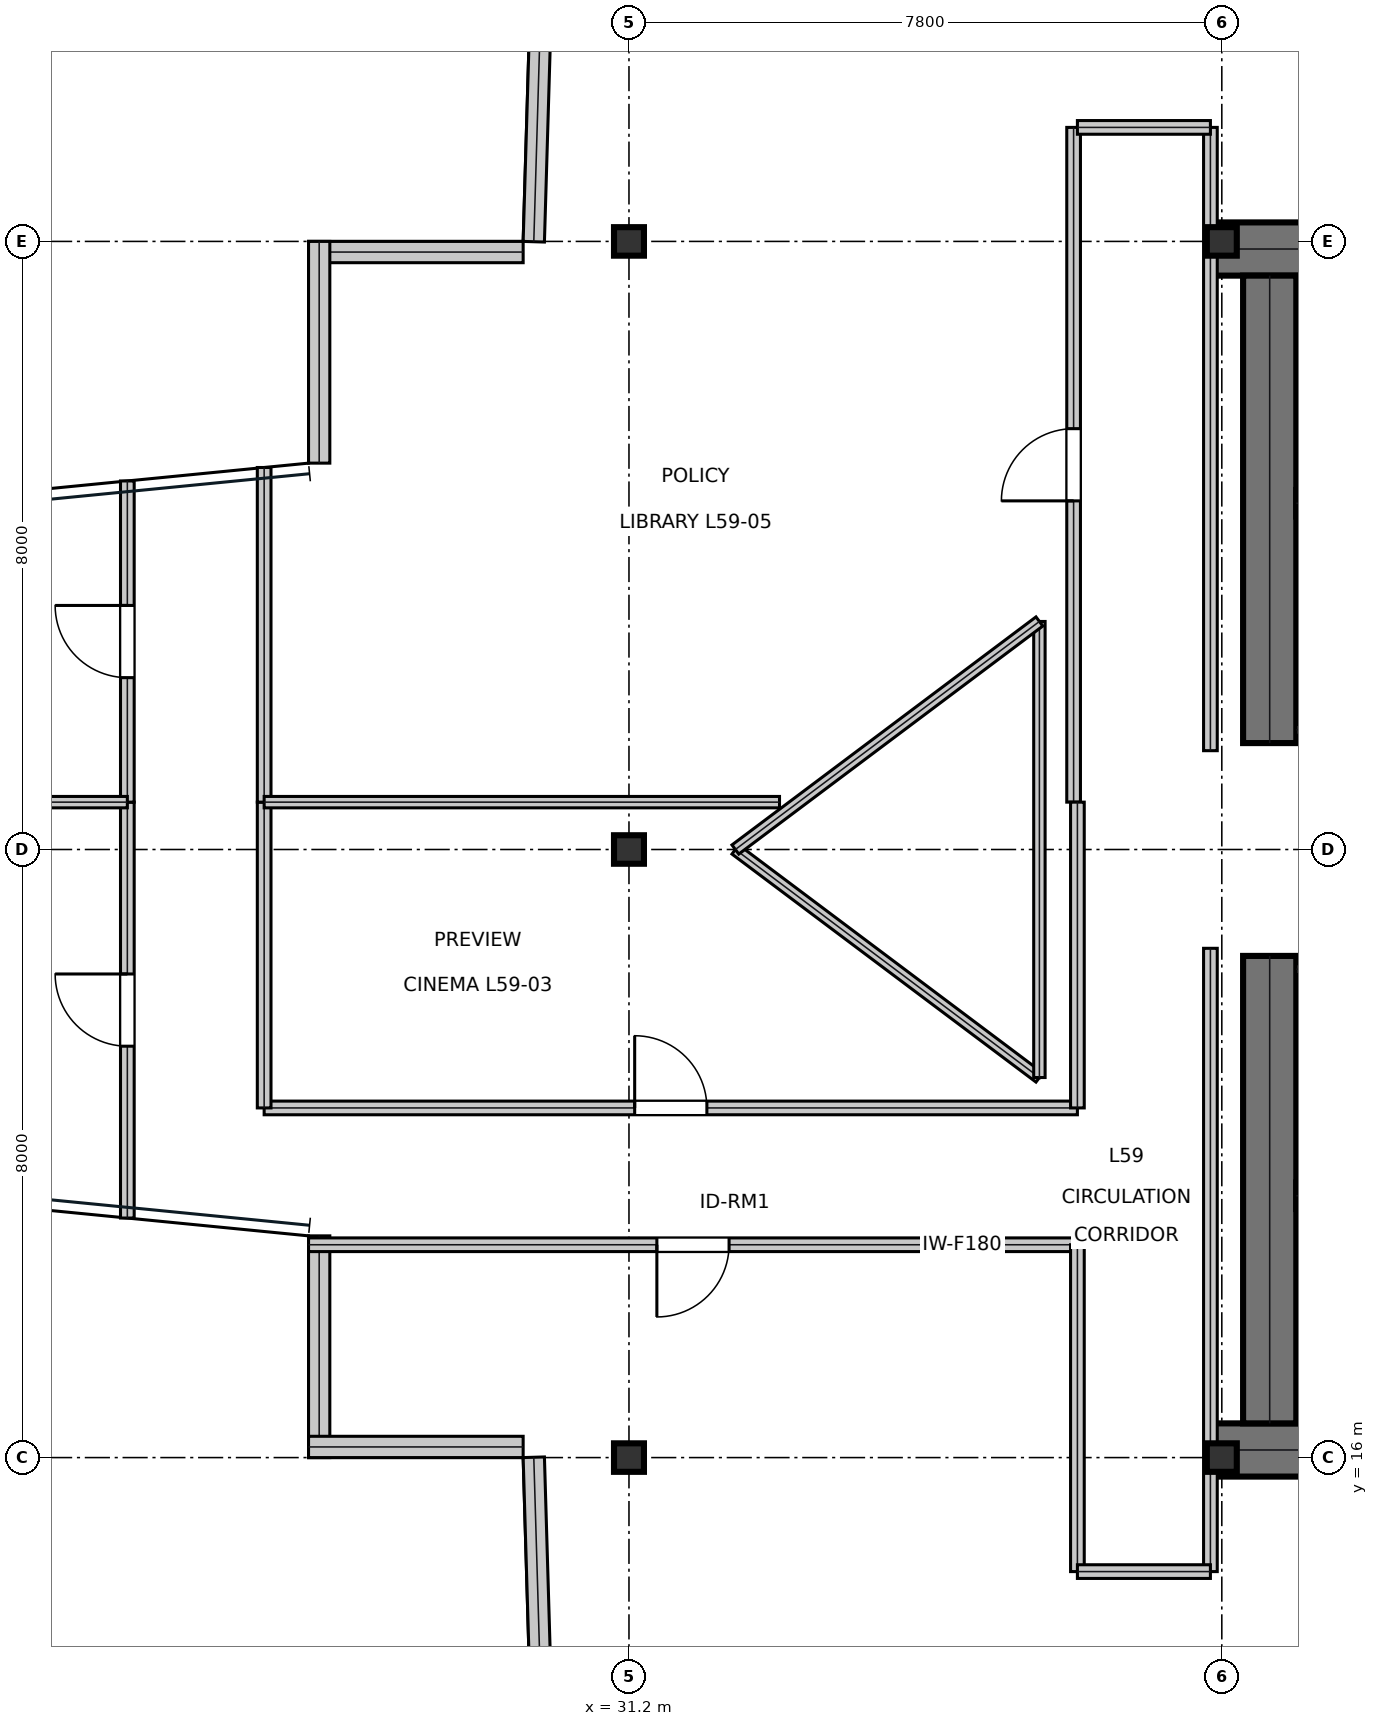
"""IFC4 building model, lengths in metres.
Left out: names, types, materials, properties, quantities, classifications, styles, units other than length and angle.
Written with IfcOpenShell. Run it as: python <this file> out.ifc"""

import sys

from ifc_helpers import new_model, si_unit, direction, frame, frame_2d, origin, origin_2d, place, context, subcontext, project, spatial, rectangle, i_section, extrude, element, fill, save


model = new_model("IFC4")
c1 = context("Model", 3, precision=1e-05, world=origin(), true_north=direction((0.0, 1.0)))
c2 = subcontext(c1, "Body", "Model", "MODEL_VIEW")
j1 = project(units=[si_unit("LENGTHUNIT", "METRE"), si_unit("PLANEANGLEUNIT", "RADIAN")], contexts=[c1])
p1 = place(None, origin())
s1 = spatial("IfcSite", under=j1, at=p1, CompositionType="ELEMENT")
p2 = place(p1, origin())
s2 = spatial("IfcBuilding", under=s1, at=p2, CompositionType="ELEMENT")
p3 = place(p2, frame((0.0, 0.0, 252.6)))
s3 = spatial("IfcBuildingStorey", under=s2, at=p3, CompositionType="ELEMENT", Elevation=252.6)
for number, where, z_axis, x_axis in (
    (1, (38.8, 31.9, 0.0), (0.0, 0.0, 1.0), (1.0, 0.0, 0.0)),
    (2, (38.8, 16.1, 0.0), (0.0, 0.0, 1.0), (1.0, 0.0, 0.0)),
):
    element("IfcWall", number, at=place(p3, frame(where, z_axis=z_axis, x_axis=x_axis)), inside=s3, PredefinedType="SHEAR", context=c2, shape_type="SweptSolid", body=[
        extrude(rectangle(XDim=16.0, YDim=0.7, at=frame_2d((8.0, 0.0))), origin(), (0.0, 0.0, 1.0), 3.73),
    ])
for number, where, z_axis, x_axis in (
    (3, (39.63, 16.45, 0.0), (0.0, 0.0, 1.0), (0.0, 1.0, 0.0)),
    (4, (39.63, 25.4, 0.0), (0.0, 0.0, 1.0), (0.0, 1.0, 0.0)),
):
    element("IfcWall", number, at=place(p3, frame(where, z_axis=z_axis, x_axis=x_axis)), inside=s3, PredefinedType="SHEAR", context=c2, shape_type="SweptSolid", body=[
        extrude(rectangle(XDim=6.15, YDim=0.7, at=frame_2d((3.075, 0.0))), origin(), (0.0, 0.0, 1.0), 3.73),
    ])
p4 = place(p3, frame((39.98, 28.555, 0.0), z_axis=(0.0, 0.0, 1.0), x_axis=(1.0, 0.0, 0.0)))
e5 = element("IfcWall", 5, at=p4, inside=s3, PredefinedType="SHEAR", context=c2, shape_type="SweptSolid", body=[
    extrude(rectangle(XDim=7.71, YDim=0.35, at=frame_2d((3.855, 0.0))), origin(), (0.0, 0.0, 1.0), 3.73),
])
p5 = place(p4, frame((0.25, 0.0, 0.0)))
e6 = element("IfcOpeningElement", 6, at=p5, cuts=e5, PredefinedType="OPENING", context=c2, shape_type="SweptSolid", body=[
    extrude(rectangle(XDim=1.1, YDim=2.15, at=frame_2d((0.55, 1.075))), frame((0.0, 0.185, 0.0), z_axis=(0.0, -1.0, 0.0), x_axis=(1.0, 0.0, 0.0)), (0.0, 0.0, 1.0), 0.37),
])
p6 = place(p3, frame((39.98, 19.445, 0.0), z_axis=(0.0, 0.0, 1.0), x_axis=(1.0, 0.0, 0.0)))
e7 = element("IfcWall", 7, at=p6, inside=s3, PredefinedType="SHEAR", context=c2, shape_type="SweptSolid", body=[
    extrude(rectangle(XDim=7.71, YDim=0.35, at=frame_2d((3.855, 0.0))), origin(), (0.0, 0.0, 1.0), 3.73),
])
p7 = place(p6, frame((0.25, 0.0, 0.0)))
e8 = element("IfcOpeningElement", 8, at=p7, cuts=e7, PredefinedType="OPENING", context=c2, shape_type="SweptSolid", body=[
    extrude(rectangle(XDim=1.1, YDim=2.15, at=frame_2d((0.55, 1.075))), frame((0.0, 0.185, 0.0), z_axis=(0.0, -1.0, 0.0), x_axis=(1.0, 0.0, 0.0)), (0.0, 0.0, 1.0), 0.37),
])
for number, where, z_axis, x_axis in (
    (9, (31.2, 16.0, 0.0), (0.0, 0.0, 1.0), (1.0, 0.0, 0.0)),
    (10, (31.2, 24.0, 0.0), (0.0, 0.0, 1.0), (1.0, 0.0, 0.0)),
    (11, (31.2, 32.0, 0.0), (0.0, 0.0, 1.0), (1.0, 0.0, 0.0)),
    (12, (39.0, 16.0, 0.0), (0.0, 0.0, 1.0), (1.0, 0.0, 0.0)),
    (13, (39.0, 32.0, 0.0), (0.0, 0.0, 1.0), (1.0, 0.0, 0.0)),
):
    element("IfcColumn", number, at=place(p3, frame(where, z_axis=z_axis, x_axis=x_axis)), inside=s3, PredefinedType="COLUMN", context=c2, shape_type="SweptSolid", body=[
        extrude(i_section(OverallWidth=0.394, OverallDepth=0.375, WebThickness=0.017, FlangeThickness=0.028, at=origin_2d()), origin(), (0.0, 0.0, 1.0), 4.044),
    ])
p8 = place(p3, frame((30.142, 38.559, 0.0), z_axis=(0.0, 0.0, 1.0), x_axis=(-0.029597919089, -0.999561885621, 0.0)))
e14 = element("IfcWall", 14, at=p8, inside=s3, PredefinedType="STANDARD", context=c2, shape_type="SweptSolid", body=[
    extrude(rectangle(XDim=6.566, YDim=0.28, at=frame_2d((3.283, 0.0))), origin(), (0.0, 0.0, 1.0), 3.73),
])
p9 = place(p3, frame((29.808, 31.86, 0.0), z_axis=(0.0, 0.0, 1.0), x_axis=(-1.0, 0.0, 0.0)))
e15 = element("IfcWall", 15, at=p9, inside=s3, PredefinedType="STANDARD", context=c2, shape_type="SweptSolid", body=[
    extrude(rectangle(XDim=2.824, YDim=0.28, at=frame_2d((1.412, 0.0))), origin(), (0.0, 0.0, 1.0), 3.73),
])
for number, where, z_axis, x_axis in (
    (16, (27.124, 32.0, 0.0), (0.0, 0.0, 1.0), (0.0, -1.0, 0.0)),
    (17, (27.124, 18.917, 0.0), (0.0, 0.0, 1.0), (0.0, -1.0, 0.0)),
):
    element("IfcWall", number, at=place(p3, frame(where, z_axis=z_axis, x_axis=x_axis)), inside=s3, PredefinedType="STANDARD", context=c2, shape_type="SweptSolid", body=[
        extrude(rectangle(XDim=2.917, YDim=0.28, at=frame_2d((1.458, 0.0))), origin(), (0.0, 0.0, 1.0), 3.259),
    ])
p10 = place(p3, frame((26.984, 16.14, 0.0), z_axis=(0.0, 0.0, 1.0), x_axis=(1.0, 0.0, 0.0)))
e18 = element("IfcWall", 18, at=p10, inside=s3, PredefinedType="STANDARD", context=c2, shape_type="SweptSolid", body=[
    extrude(rectangle(XDim=2.824, YDim=0.28, at=frame_2d((1.412, 0.0))), origin(), (0.0, 0.0, 1.0), 3.73),
])
p11 = place(p3, frame((29.948, 16.004, 0.0), z_axis=(0.0, 0.0, 1.0), x_axis=(0.029597919089, -0.999561885621, 0.0)))
e19 = element("IfcWall", 19, at=p11, inside=s3, PredefinedType="STANDARD", context=c2, shape_type="SweptSolid", body=[
    extrude(rectangle(XDim=6.566, YDim=0.28, at=frame_2d((3.283, 0.0))), origin(), (0.0, 0.0, 1.0), 3.73),
])
p12 = place(p3, frame((39.98, 25.575, 0.0), z_axis=(0.0, 0.0, 1.0), x_axis=(1.0, 0.0, 0.0)))
e20 = element("IfcWall", 20, at=p12, inside=s3, PredefinedType="PARTITIONING", context=c2, shape_type="SweptSolid", body=[
    extrude(rectangle(XDim=5.9, YDim=0.15, at=frame_2d((2.95, 0.0))), origin(), (0.0, 0.0, 1.0), 3.73),
])
p13 = place(p12, frame((2.35, 0.0, 0.0)))
e21 = element("IfcOpeningElement", 21, at=p13, cuts=e20, PredefinedType="OPENING", context=c2, shape_type="SweptSolid", body=[
    extrude(rectangle(XDim=1.05, YDim=2.15, at=frame_2d((0.525, 1.075))), frame((0.0, 0.085, 0.0), z_axis=(0.0, -1.0, 0.0), x_axis=(1.0, 0.0, 0.0)), (0.0, 0.0, 1.0), 0.17),
])
p14 = place(p3, frame((39.98, 22.425, 0.0), z_axis=(0.0, 0.0, 1.0), x_axis=(1.0, 0.0, 0.0)))
e22 = element("IfcWall", 22, at=p14, inside=s3, PredefinedType="PARTITIONING", context=c2, shape_type="SweptSolid", body=[
    extrude(rectangle(XDim=5.9, YDim=0.15, at=frame_2d((2.95, 0.0))), origin(), (0.0, 0.0, 1.0), 3.73),
])
p15 = place(p14, frame((2.35, 0.0, 0.0)))
e23 = element("IfcOpeningElement", 23, at=p15, cuts=e22, PredefinedType="OPENING", context=c2, shape_type="SweptSolid", body=[
    extrude(rectangle(XDim=1.05, YDim=2.15, at=frame_2d((0.525, 1.075))), frame((0.0, 0.085, 0.0), z_axis=(0.0, -1.0, 0.0), x_axis=(1.0, 0.0, 0.0)), (0.0, 0.0, 1.0), 0.17),
])
p16 = place(p3, frame((26.984, 18.8, 0.0), z_axis=(0.0, 0.0, 1.0), x_axis=(1.0, 0.0, 0.0)))
e24 = element("IfcWall", 24, at=p16, inside=s3, PredefinedType="SOLIDWALL", context=c2, shape_type="SweptSolid", body=[
    extrude(rectangle(XDim=10.116, YDim=0.18, at=frame_2d((5.058, 0.0))), origin(), (0.0, 0.0, 1.0), 3.181),
])
p17 = place(p16, frame((4.583, 0.0, 0.0)))
e25 = element("IfcOpeningElement", 25, at=p17, cuts=e24, PredefinedType="OPENING", context=c2, shape_type="SweptSolid", body=[
    extrude(rectangle(XDim=0.95, YDim=2.15, at=frame_2d((0.475, 1.075))), frame((0.0, 0.1, 0.0), z_axis=(0.0, -1.0, 0.0), x_axis=(1.0, 0.0, 0.0)), (0.0, 0.0, 1.0), 0.2),
])
p18 = place(p3, frame((24.6, 19.151, 0.0), z_axis=(0.0, 0.0, 1.0), x_axis=(0.0, 1.0, 0.0)))
e26 = element("IfcWall", 26, at=p18, inside=s3, PredefinedType="SOLIDWALL", context=c2, shape_type="SweptSolid", body=[
    extrude(rectangle(XDim=5.472, YDim=0.18, at=frame_2d((2.736, 0.0))), origin(), (0.0, 0.0, 1.0), 3.181),
])
p19 = place(p18, frame((2.261, 0.0, 0.0)))
e27 = element("IfcOpeningElement", 27, at=p19, cuts=e26, PredefinedType="OPENING", context=c2, shape_type="SweptSolid", body=[
    extrude(rectangle(XDim=0.95, YDim=2.15, at=frame_2d((0.475, 1.075))), frame((0.0, 0.1, 0.0), z_axis=(0.0, -1.0, 0.0), x_axis=(1.0, 0.0, 0.0)), (0.0, 0.0, 1.0), 0.2),
])
p20 = place(p3, frame((26.4, 20.6, 0.0), z_axis=(0.0, 0.0, 1.0), x_axis=(1.0, 0.0, 0.0)))
e28 = element("IfcWall", 28, at=p20, inside=s3, PredefinedType="SOLIDWALL", context=c2, shape_type="SweptSolid", body=[
    extrude(rectangle(XDim=10.7, YDim=0.18, at=frame_2d((5.35, 0.0))), origin(), (0.0, 0.0, 1.0), 3.181),
])
p21 = place(p20, frame((4.875, 0.0, 0.0)))
e29 = element("IfcOpeningElement", 29, at=p21, cuts=e28, PredefinedType="OPENING", context=c2, shape_type="SweptSolid", body=[
    extrude(rectangle(XDim=0.95, YDim=2.15, at=frame_2d((0.475, 1.075))), frame((0.0, 0.1, 0.0), z_axis=(0.0, -1.0, 0.0), x_axis=(1.0, 0.0, 0.0)), (0.0, 0.0, 1.0), 0.2),
])
p22 = place(p3, frame((24.6, 24.623, 0.0), z_axis=(0.0, 0.0, 1.0), x_axis=(0.0, 1.0, 0.0)))
e30 = element("IfcWall", 30, at=p22, inside=s3, PredefinedType="SOLIDWALL", context=c2, shape_type="SweptSolid", body=[
    extrude(rectangle(XDim=4.226, YDim=0.18, at=frame_2d((2.113, 0.0))), origin(), (0.0, 0.0, 1.0), 3.181),
])
p23 = place(p22, frame((1.638, 0.0, 0.0)))
e31 = element("IfcOpeningElement", 31, at=p23, cuts=e30, PredefinedType="OPENING", context=c2, shape_type="SweptSolid", body=[
    extrude(rectangle(XDim=0.95, YDim=2.15, at=frame_2d((0.475, 1.075))), frame((0.0, 0.1, 0.0), z_axis=(0.0, -1.0, 0.0), x_axis=(1.0, 0.0, 0.0)), (0.0, 0.0, 1.0), 0.2),
])
p24 = place(p3, frame((37.05, 24.623, 0.0), z_axis=(0.0, 0.0, 1.0), x_axis=(0.0, 1.0, 0.0)))
e32 = element("IfcWall", 32, at=p24, inside=s3, PredefinedType="SOLIDWALL", context=c2, shape_type="SweptSolid", body=[
    extrude(rectangle(XDim=8.877, YDim=0.18, at=frame_2d((4.438, 0.0))), origin(), (0.0, 0.0, 1.0), 3.181),
])
p25 = place(p24, frame((3.963, 0.0, 0.0)))
e33 = element("IfcOpeningElement", 33, at=p25, cuts=e32, PredefinedType="OPENING", context=c2, shape_type="SweptSolid", body=[
    extrude(rectangle(XDim=0.95, YDim=2.15, at=frame_2d((0.475, 1.075))), frame((0.0, 0.1, 0.0), z_axis=(0.0, -1.0, 0.0), x_axis=(1.0, 0.0, 0.0)), (0.0, 0.0, 1.0), 0.2),
])
p26 = place(p3, frame((38.85, 14.5, 0.0), z_axis=(0.0, 0.0, 1.0), x_axis=(0.0, 1.0, 0.0)))
e34 = element("IfcWall", 34, at=p26, inside=s3, PredefinedType="SOLIDWALL", context=c2, shape_type="SweptSolid", body=[
    extrude(rectangle(XDim=8.2, YDim=0.18, at=frame_2d((4.1, 0.0))), origin(), (0.0, 0.0, 1.0), 3.181),
])
p27 = place(p3, frame((37.1, 14.5, 0.0), z_axis=(0.0, 0.0, 1.0), x_axis=(0.0, 1.0, 0.0)))
e35 = element("IfcWall", 35, at=p27, inside=s3, PredefinedType="SOLIDWALL", context=c2, shape_type="SweptSolid", body=[
    extrude(rectangle(XDim=4.3, YDim=0.18, at=frame_2d((2.15, 0.0))), origin(), (0.0, 0.0, 1.0), 3.181),
])
p28 = place(p3, frame((37.1, 14.5, 0.0), z_axis=(0.0, 0.0, 1.0), x_axis=(1.0, 0.0, 0.0)))
e36 = element("IfcWall", 36, at=p28, inside=s3, PredefinedType="SOLIDWALL", context=c2, shape_type="SweptSolid", body=[
    extrude(rectangle(XDim=1.75, YDim=0.18, at=frame_2d((0.875, 0.0))), origin(), (0.0, 0.0, 1.0), 3.181),
])
p29 = place(p3, frame((26.4, 20.6, 0.0), z_axis=(0.0, 0.0, 1.0), x_axis=(0.0, 1.0, 0.0)))
e37 = element("IfcWall", 37, at=p29, inside=s3, PredefinedType="SOLIDWALL", context=c2, shape_type="SweptSolid", body=[
    extrude(rectangle(XDim=4.023, YDim=0.18, at=frame_2d((2.011, 0.0))), origin(), (0.0, 0.0, 1.0), 3.181),
])
p30 = place(p3, frame((37.1, 20.6, 0.0), z_axis=(0.0, 0.0, 1.0), x_axis=(0.0, 1.0, 0.0)))
e38 = element("IfcWall", 38, at=p30, inside=s3, PredefinedType="SOLIDWALL", context=c2, shape_type="SweptSolid", body=[
    extrude(rectangle(XDim=4.023, YDim=0.18, at=frame_2d((2.011, 0.0))), origin(), (0.0, 0.0, 1.0), 3.73),
])
p31 = place(p3, frame((38.85, 25.3, 0.0), z_axis=(0.0, 0.0, 1.0), x_axis=(0.0, 1.0, 0.0)))
e39 = element("IfcWall", 39, at=p31, inside=s3, PredefinedType="SOLIDWALL", context=c2, shape_type="SweptSolid", body=[
    extrude(rectangle(XDim=8.2, YDim=0.18, at=frame_2d((4.1, 0.0))), origin(), (0.0, 0.0, 1.0), 3.181),
])
p32 = place(p3, frame((26.4, 24.623, 0.0), z_axis=(0.0, 0.0, 1.0), x_axis=(0.0, 1.0, 0.0)))
e40 = element("IfcWall", 40, at=p32, inside=s3, PredefinedType="SOLIDWALL", context=c2, shape_type="SweptSolid", body=[
    extrude(rectangle(XDim=4.403, YDim=0.18, at=frame_2d((2.201, 0.0))), origin(), (0.0, 0.0, 1.0), 3.181),
])
p33 = place(p3, frame((37.1, 33.5, 0.0), z_axis=(0.0, 0.0, 1.0), x_axis=(1.0, 0.0, 0.0)))
e41 = element("IfcWall", 41, at=p33, inside=s3, PredefinedType="SOLIDWALL", context=c2, shape_type="SweptSolid", body=[
    extrude(rectangle(XDim=1.75, YDim=0.18, at=frame_2d((0.875, 0.0))), origin(), (0.0, 0.0, 1.0), 3.181),
])
p34 = place(p3, frame((15.076, 24.623, 0.0), z_axis=(0.0, 0.0, 1.0), x_axis=(1.0, 0.0, 0.0)))
e42 = element("IfcWall", 42, at=p34, inside=s3, PredefinedType="MOVABLE", context=c2, shape_type="SweptSolid", body=[
    extrude(rectangle(XDim=9.524, YDim=0.15, at=frame_2d((4.762, 0.0))), origin(), (0.0, 0.0, 1.0), 3.408),
])
p35 = place(p3, frame((26.4, 24.623, 0.0), z_axis=(0.0, 0.0, 1.0), x_axis=(1.0, 0.0, 0.0)))
e43 = element("IfcWall", 43, at=p35, inside=s3, PredefinedType="MOVABLE", context=c2, shape_type="SweptSolid", body=[
    extrude(rectangle(XDim=6.781, YDim=0.15, at=frame_2d((3.39, 0.0))), origin(), (0.0, 0.0, 1.0), 3.181),
])
p36 = place(p3, frame((32.6, 24.0, 0.0), z_axis=(0.0, 0.0, 1.0), x_axis=(0.8, -0.6, 0.0)))
e44 = element("IfcWall", 44, at=p36, inside=s3, PredefinedType="MOVABLE", context=c2, shape_type="SweptSolid", body=[
    extrude(rectangle(XDim=5.0, YDim=0.15, at=frame_2d((2.5, 0.0))), origin(), (0.0, 0.0, 1.0), 3.73),
])
p37 = place(p3, frame((36.6, 21.0, 0.0), z_axis=(0.0, 0.0, 1.0), x_axis=(0.0, 1.0, 0.0)))
e45 = element("IfcWall", 45, at=p37, inside=s3, PredefinedType="MOVABLE", context=c2, shape_type="SweptSolid", body=[
    extrude(rectangle(XDim=6.0, YDim=0.15, at=frame_2d((3.0, 0.0))), origin(), (0.0, 0.0, 1.0), 3.73),
])
p38 = place(p3, frame((36.6, 27.0, 0.0), z_axis=(0.0, 0.0, 1.0), x_axis=(-0.8, -0.6, 0.0)))
e46 = element("IfcWall", 46, at=p38, inside=s3, PredefinedType="MOVABLE", context=c2, shape_type="SweptSolid", body=[
    extrude(rectangle(XDim=5.0, YDim=0.15, at=frame_2d((2.5, 0.0))), origin(), (0.0, 0.0, 1.0), 3.73),
])
p39 = place(p17, frame((0.95, 0.0, 0.0), z_axis=(0.0, 0.0, 1.0), x_axis=(-1.0, 0.0, 0.0)))
e47 = element("IfcDoor", 47, at=p39, inside=s3, OperationType="SINGLE_SWING_RIGHT", PredefinedType="DOOR", context=c2, shape_type="SweptSolid", body=[
    extrude(rectangle(XDim=0.95, YDim=2.15, at=frame_2d((0.475, 1.075))), frame((0.0, 0.025, 0.0), z_axis=(0.0, -1.0, 0.0), x_axis=(1.0, 0.0, 0.0)), (0.0, 0.0, 1.0), 0.05),
])
fill(e25, e47)
p40 = place(p19, origin())
e48 = element("IfcDoor", 48, at=p40, inside=s3, OperationType="SINGLE_SWING_RIGHT", PredefinedType="DOOR", context=c2, shape_type="SweptSolid", body=[
    extrude(rectangle(XDim=0.95, YDim=2.15, at=frame_2d((0.475, 1.075))), frame((0.0, 0.025, 0.0), z_axis=(0.0, -1.0, 0.0), x_axis=(1.0, 0.0, 0.0)), (0.0, 0.0, 1.0), 0.05),
])
fill(e27, e48)
p41 = place(p21, origin())
e49 = element("IfcDoor", 49, at=p41, inside=s3, OperationType="SINGLE_SWING_LEFT", PredefinedType="DOOR", context=c2, shape_type="SweptSolid", body=[
    extrude(rectangle(XDim=0.95, YDim=2.15, at=frame_2d((0.475, 1.075))), frame((0.0, 0.025, 0.0), z_axis=(0.0, -1.0, 0.0), x_axis=(1.0, 0.0, 0.0)), (0.0, 0.0, 1.0), 0.05),
])
fill(e29, e49)
p42 = place(p23, origin())
e50 = element("IfcDoor", 50, at=p42, inside=s3, OperationType="SINGLE_SWING_RIGHT", PredefinedType="DOOR", context=c2, shape_type="SweptSolid", body=[
    extrude(rectangle(XDim=0.95, YDim=2.15, at=frame_2d((0.475, 1.075))), frame((0.0, 0.025, 0.0), z_axis=(0.0, -1.0, 0.0), x_axis=(1.0, 0.0, 0.0)), (0.0, 0.0, 1.0), 0.05),
])
fill(e31, e50)
p43 = place(p25, origin())
e51 = element("IfcDoor", 51, at=p43, inside=s3, OperationType="SINGLE_SWING_LEFT", PredefinedType="DOOR", context=c2, shape_type="SweptSolid", body=[
    extrude(rectangle(XDim=0.95, YDim=2.15, at=frame_2d((0.475, 1.075))), frame((0.0, 0.025, 0.0), z_axis=(0.0, -1.0, 0.0), x_axis=(1.0, 0.0, 0.0)), (0.0, 0.0, 1.0), 0.05),
])
fill(e33, e51)
save(model, sys.argv[1])
